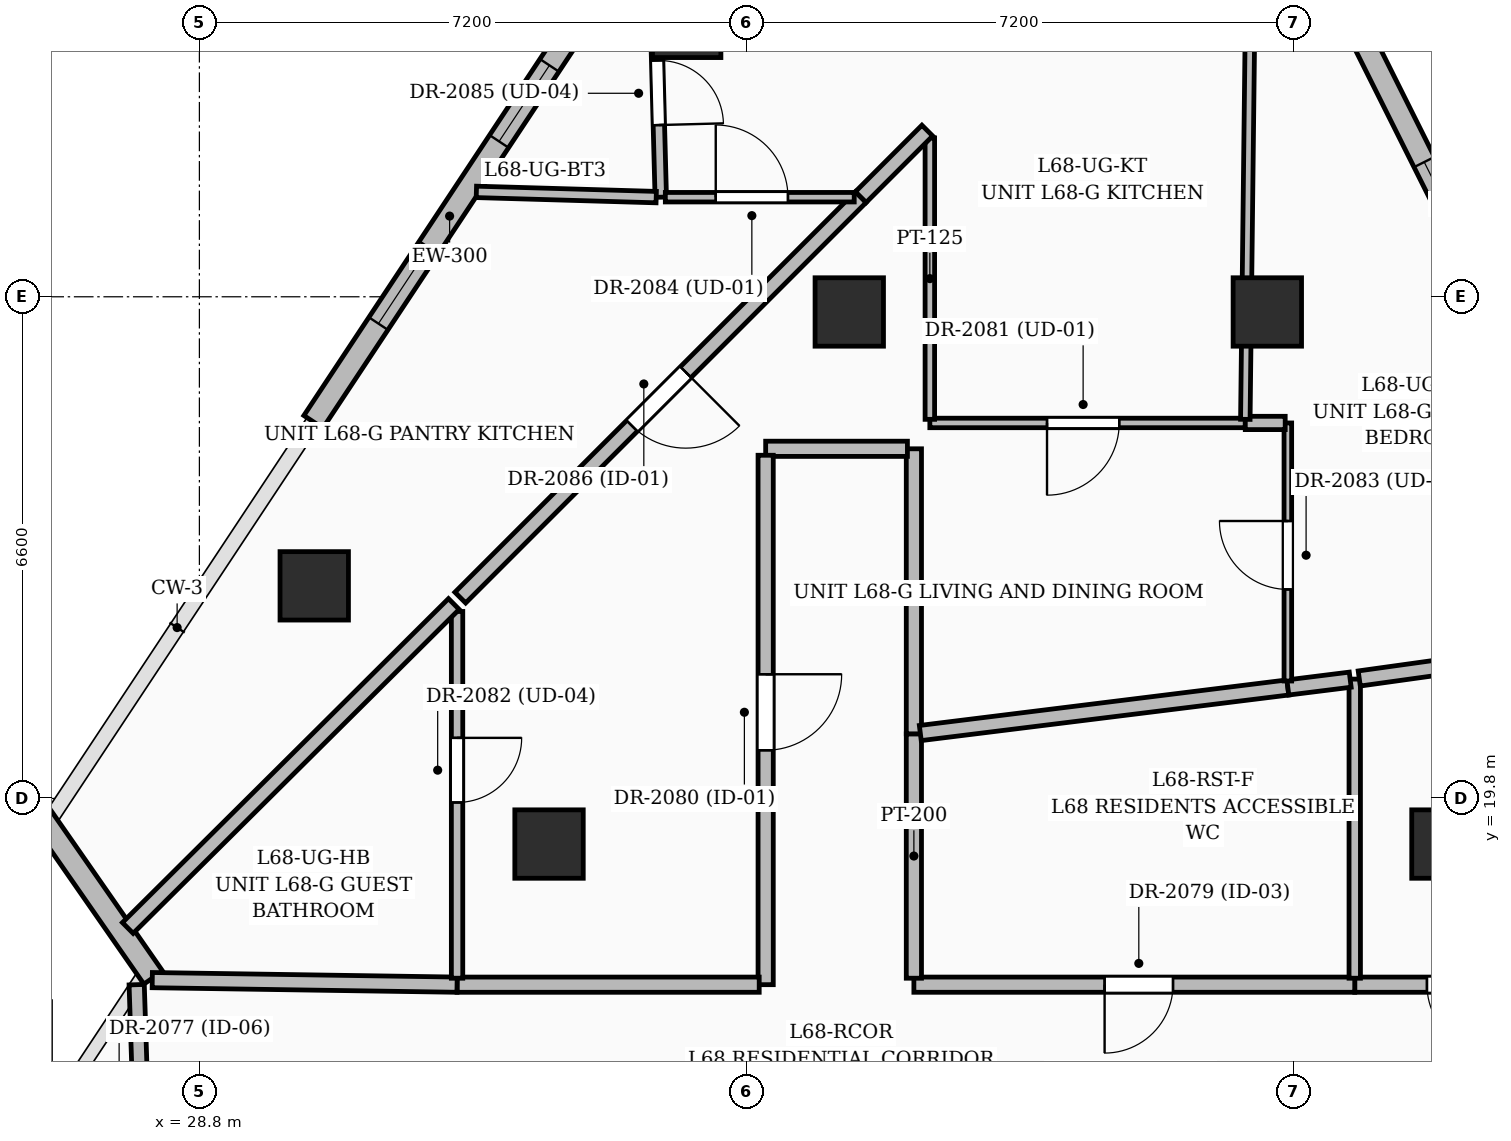
"""IFC4 building model, lengths in metres.
Left out: names, types, materials, properties, quantities, classifications, styles, units other than length and angle.
Written with IfcOpenShell. Run it as: python <this file> out.ifc"""

import sys

from ifc_helpers import new_model, si_unit, direction, frame, frame_2d, origin, origin_2d, place, context, subcontext, project, spatial, rectangle, extrude, element, fill, save


model = new_model("IFC4")
c1 = context("Model", 3, precision=1e-05, world=origin(), true_north=direction((0.0, 1.0)))
c2 = subcontext(c1, "Body", "Model", "MODEL_VIEW")
j1 = project(units=[si_unit("LENGTHUNIT", "METRE"), si_unit("PLANEANGLEUNIT", "RADIAN")], contexts=[c1])
p1 = place(None, origin())
s1 = spatial("IfcSite", under=j1, at=p1, CompositionType="ELEMENT")
p2 = place(p1, origin())
s2 = spatial("IfcBuilding", under=s1, at=p2, CompositionType="ELEMENT")
p3 = place(p2, frame((0.0, 0.0, 263.25)))
s3 = spatial("IfcBuildingStorey", under=s2, at=p3, CompositionType="ELEMENT", Elevation=263.25)
for number, where, z_axis, x_axis in (
    (1, (45.2, 19.2, 0.0), (0.0, 0.0, 1.0), (1.0, 0.0, 0.0)),
    (2, (42.85, 26.2, 0.0), (0.0, 0.0, 1.0), (1.0, 0.0, 0.0)),
    (3, (37.35, 26.2, 0.0), (0.0, 0.0, 1.0), (1.0, 0.0, 0.0)),
    (4, (33.4, 19.2, 0.0), (0.0, 0.0, 1.0), (1.0, 0.0, 0.0)),
    (5, (35.211, 29.997, 0.0), (0.0, 0.0, 1.0), (1.0, 0.0, 0.0)),
    (6, (30.311, 22.597, 0.0), (0.0, 0.0, 1.0), (1.0, 0.0, 0.0)),
):
    element("IfcColumn", number, at=place(p3, frame(where, z_axis=z_axis, x_axis=x_axis)), inside=s3, PredefinedType="COLUMN", context=c2, shape_type="SweptSolid", body=[
        extrude(rectangle(XDim=0.9, YDim=0.9, at=origin_2d()), origin(), (0.0, 0.0, 1.0), 3.75),
    ])
p4 = place(p3, frame((24.557, 16.318, 0.0), z_axis=(0.0, 0.0, 1.0), x_axis=(0.978804667181, -0.204796053441, 0.0)))
e7 = element("IfcWall", 7, at=p4, inside=s3, PredefinedType="SOLIDWALL", context=c2, shape_type="SweptSolid", body=[
    extrude(rectangle(XDim=2.594, YDim=0.3, at=frame_2d((1.297, 0.0))), origin(), (0.0, 0.0, 1.0), 2.825),
])
p5 = place(p4, frame((0.675, 0.0, 0.8)))
e8 = element("IfcOpeningElement", 8, at=p5, cuts=e7, PredefinedType="OPENING", context=c2, shape_type="SweptSolid", body=[
    extrude(rectangle(XDim=1.2, YDim=1.8, at=frame_2d((0.6, 0.9))), frame((0.0, 0.16, 0.0), z_axis=(0.0, -1.0, 0.0), x_axis=(1.0, 0.0, 0.0)), (0.0, 0.0, 1.0), 0.32),
])
p6 = place(p3, frame((28.193, 17.443, 0.0), z_axis=(0.0, 0.0, 1.0), x_axis=(-0.570819039355, 0.821075894367, 0.0)))
e9 = element("IfcWall", 9, at=p6, inside=s3, PredefinedType="SOLIDWALL", context=c2, shape_type="SweptSolid", body=[
    extrude(rectangle(XDim=2.594, YDim=0.3, at=frame_2d((1.297, 0.0))), origin(), (0.0, 0.0, 1.0), 2.825),
])
p7 = place(p3, frame((30.3, 24.755, 0.0), z_axis=(0.0, 0.0, 1.0), x_axis=(0.552146443909, 0.833747146609, 0.0)))
e10 = element("IfcWall", 10, at=p7, inside=s3, PredefinedType="SOLIDWALL", context=c2, shape_type="SweptSolid", body=[
    extrude(rectangle(XDim=6.493, YDim=0.3, at=frame_2d((3.246, 0.0))), origin(), (0.0, 0.0, 1.0), 3.5),
])
p8 = place(p7, frame((4.425, 0.0, 0.8)))
e11 = element("IfcOpeningElement", 11, at=p8, cuts=e10, PredefinedType="OPENING", context=c2, shape_type="SweptSolid", body=[
    extrude(rectangle(XDim=1.2, YDim=1.8, at=frame_2d((0.6, 0.9))), frame((0.0, 0.16, 0.0), z_axis=(0.0, -1.0, 0.0), x_axis=(1.0, 0.0, 0.0)), (0.0, 0.0, 1.0), 0.32),
])
p9 = place(p7, frame((1.55, 0.0, 0.8)))
e12 = element("IfcOpeningElement", 12, at=p9, cuts=e10, PredefinedType="OPENING", context=c2, shape_type="SweptSolid", body=[
    extrude(rectangle(XDim=1.2, YDim=1.8, at=frame_2d((0.6, 0.9))), frame((0.0, 0.16, 0.0), z_axis=(0.0, -1.0, 0.0), x_axis=(1.0, 0.0, 0.0)), (0.0, 0.0, 1.0), 0.32),
])
p10 = place(p3, frame((44.098, 29.804, 0.0), z_axis=(0.0, 0.0, 1.0), x_axis=(0.447260869873, -0.894403552252, 0.0)))
e13 = element("IfcWall", 13, at=p10, inside=s3, PredefinedType="SOLIDWALL", context=c2, shape_type="SweptSolid", body=[
    extrude(rectangle(XDim=6.197, YDim=0.3, at=frame_2d((3.099, 0.0))), origin(), (0.0, 0.0, 1.0), 3.5),
])
p11 = place(p10, frame((1.825, 0.0, 0.6)))
e14 = element("IfcOpeningElement", 14, at=p11, cuts=e13, PredefinedType="OPENING", context=c2, shape_type="SweptSolid", body=[
    extrude(rectangle(XDim=2.4, YDim=2.1, at=frame_2d((1.2, 1.05))), frame((0.0, 0.16, 0.0), z_axis=(0.0, -1.0, 0.0), x_axis=(1.0, 0.0, 0.0)), (0.0, 0.0, 1.0), 0.32),
])
p12 = place(p3, frame((27.975, 17.35, 0.0), z_axis=(0.0, 0.0, 1.0), x_axis=(0.032569486082, -0.999469473559, 0.0)))
e15 = element("IfcWall", 15, at=p12, inside=s3, PredefinedType="PARTITIONING", context=c2, shape_type="SweptSolid", body=[
    extrude(rectangle(XDim=2.301, YDim=0.2, at=frame_2d((1.151, 0.0))), origin(), (0.0, 0.0, 1.0), 3.5),
])
p13 = place(p12, frame((1.077, 0.0, 0.0)))
e16 = element("IfcOpeningElement", 16, at=p13, cuts=e15, PredefinedType="OPENING", context=c2, shape_type="SweptSolid", body=[
    extrude(rectangle(XDim=0.85, YDim=2.1, at=frame_2d((0.425, 1.05))), frame((0.0, 0.11, 0.0), z_axis=(0.0, -1.0, 0.0), x_axis=(1.0, 0.0, 0.0)), (0.0, 0.0, 1.0), 0.22),
])
p14 = place(p3, frame((46.715, 17.35, 0.0), z_axis=(0.0, 0.0, 1.0), x_axis=(-1.0, 0.0, 0.0)))
e17 = element("IfcWall", 17, at=p14, inside=s3, PredefinedType="PARTITIONING", context=c2, shape_type="SweptSolid", body=[
    extrude(rectangle(XDim=2.715, YDim=0.2, at=frame_2d((1.357, 0.0))), origin(), (0.0, 0.0, 1.0), 2.685),
])
p15 = place(p14, frame((0.865, 0.0, 0.0)))
e18 = element("IfcOpeningElement", 18, at=p15, cuts=e17, PredefinedType="OPENING", context=c2, shape_type="SweptSolid", body=[
    extrude(rectangle(XDim=0.9, YDim=2.1, at=frame_2d((0.45, 1.05))), frame((0.0, 0.11, 0.0), z_axis=(0.0, -1.0, 0.0), x_axis=(1.0, 0.0, 0.0)), (0.0, 0.0, 1.0), 0.22),
])
p16 = place(p3, frame((44.0, 17.35, 0.0), z_axis=(0.0, 0.0, 1.0), x_axis=(-1.0, 0.0, 0.0)))
e19 = element("IfcWall", 19, at=p16, inside=s3, PredefinedType="PARTITIONING", context=c2, shape_type="SweptSolid", body=[
    extrude(rectangle(XDim=5.8, YDim=0.2, at=frame_2d((2.9, 0.0))), origin(), (0.0, 0.0, 1.0), 3.5),
])
p17 = place(p16, frame((2.391, 0.0, 0.0)))
e20 = element("IfcOpeningElement", 20, at=p17, cuts=e19, PredefinedType="OPENING", context=c2, shape_type="SweptSolid", body=[
    extrude(rectangle(XDim=0.9, YDim=2.1, at=frame_2d((0.45, 1.05))), frame((0.0, 0.11, 0.0), z_axis=(0.0, -1.0, 0.0), x_axis=(1.0, 0.0, 0.0)), (0.0, 0.0, 1.0), 0.22),
])
p18 = place(p3, frame((38.2, 17.435, 0.0), z_axis=(0.0, 0.0, 1.0), x_axis=(0.0, 1.0, 0.0)))
e21 = element("IfcWall", 21, at=p18, inside=s3, PredefinedType="PARTITIONING", context=c2, shape_type="SweptSolid", body=[
    extrude(rectangle(XDim=3.215, YDim=0.2, at=frame_2d((1.607, 0.0))), origin(), (0.0, 0.0, 1.0), 3.5),
])
p19 = place(p3, frame((38.2, 20.65, 0.0), z_axis=(0.0, 0.0, 1.0), x_axis=(0.0, 1.0, 0.0)))
e22 = element("IfcWall", 22, at=p19, inside=s3, PredefinedType="PARTITIONING", context=c2, shape_type="SweptSolid", body=[
    extrude(rectangle(XDim=3.75, YDim=0.2, at=frame_2d((1.875, 0.0))), origin(), (0.0, 0.0, 1.0), 3.5),
])
p20 = place(p3, frame((38.115, 24.4, 0.0), z_axis=(0.0, 0.0, 1.0), x_axis=(-1.0, 0.0, 0.0)))
e23 = element("IfcWall", 23, at=p20, inside=s3, PredefinedType="PARTITIONING", context=c2, shape_type="SweptSolid", body=[
    extrude(rectangle(XDim=1.865, YDim=0.2, at=frame_2d((0.933, 0.0))), origin(), (0.0, 0.0, 1.0), 2.685),
])
p21 = place(p3, frame((36.25, 24.315, 0.0), z_axis=(0.0, 0.0, 1.0), x_axis=(0.0, -1.0, 0.0)))
e24 = element("IfcWall", 24, at=p21, inside=s3, PredefinedType="PARTITIONING", context=c2, shape_type="SweptSolid", body=[
    extrude(rectangle(XDim=6.965, YDim=0.2, at=frame_2d((3.482, 0.0))), origin(), (0.0, 0.0, 1.0), 2.685),
])
p22 = place(p21, frame((2.881, 0.0, 0.0)))
e25 = element("IfcOpeningElement", 25, at=p22, cuts=e24, PredefinedType="OPENING", context=c2, shape_type="SweptSolid", body=[
    extrude(rectangle(XDim=1.0, YDim=2.2, at=frame_2d((0.5, 1.1))), frame((0.0, 0.11, 0.0), z_axis=(0.0, -1.0, 0.0), x_axis=(1.0, 0.0, 0.0)), (0.0, 0.0, 1.0), 0.22),
])
p23 = place(p3, frame((36.165, 17.35, 0.0), z_axis=(0.0, 0.0, 1.0), x_axis=(-1.0, 0.0, 0.0)))
e26 = element("IfcWall", 26, at=p23, inside=s3, PredefinedType="PARTITIONING", context=c2, shape_type="SweptSolid", body=[
    extrude(rectangle(XDim=3.975, YDim=0.2, at=frame_2d((1.988, 0.0))), origin(), (0.0, 0.0, 1.0), 2.685),
])
p24 = place(p3, frame((32.19, 17.35, 0.0), z_axis=(0.0, 0.0, 1.0), x_axis=(-0.999888770764, 0.014914627022, 0.0)))
e27 = element("IfcWall", 27, at=p24, inside=s3, PredefinedType="PARTITIONING", context=c2, shape_type="SweptSolid", body=[
    extrude(rectangle(XDim=4.01, YDim=0.2, at=frame_2d((2.005, 0.0))), origin(), (0.0, 0.0, 1.0), 3.5),
])
p25 = place(p3, frame((44.0, 21.37, 0.0), z_axis=(0.0, 0.0, 1.0), x_axis=(0.0, -1.0, 0.0)))
e28 = element("IfcWall", 28, at=p25, inside=s3, PredefinedType="PARTITIONING", context=c2, shape_type="SweptSolid", body=[
    extrude(rectangle(XDim=3.935, YDim=0.15, at=frame_2d((1.968, 0.0))), origin(), (0.0, 0.0, 1.0), 3.5),
])
p26 = place(p3, frame((45.787, 21.619, 0.0), z_axis=(0.0, 0.0, 1.0), x_axis=(-0.99045250239, -0.137854417812, 0.0)))
e29 = element("IfcWall", 29, at=p26, inside=s3, PredefinedType="PARTITIONING", context=c2, shape_type="SweptSolid", body=[
    extrude(rectangle(XDim=1.744, YDim=0.2, at=frame_2d((0.872, 0.0))), origin(), (0.0, 0.0, 1.0), 2.685),
])
p27 = place(p3, frame((43.12, 21.26, 0.0), z_axis=(0.0, 0.0, 1.0), x_axis=(-0.992399953156, -0.123054187154, 0.0)))
e30 = element("IfcWall", 30, at=p27, inside=s3, PredefinedType="PARTITIONING", context=c2, shape_type="SweptSolid", body=[
    extrude(rectangle(XDim=4.873, YDim=0.2, at=frame_2d((2.437, 0.0))), origin(), (0.0, 0.0, 1.0), 3.5),
])
p28 = place(p3, frame((43.94, 21.363, 0.0), z_axis=(0.0, 0.0, 1.0), x_axis=(-0.992277876714, -0.124034734589, 0.0)))
e31 = element("IfcWall", 31, at=p28, inside=s3, PredefinedType="PARTITIONING", context=c2, shape_type="SweptSolid", body=[
    extrude(rectangle(XDim=0.827, YDim=0.2, at=frame_2d((0.413, 0.0))), origin(), (0.0, 0.0, 1.0), 3.5),
])
p29 = place(p3, frame((32.19, 22.26, 0.0), z_axis=(0.0, 0.0, 1.0), x_axis=(0.0, -1.0, 0.0)))
e32 = element("IfcWall", 32, at=p29, inside=s3, PredefinedType="PARTITIONING", context=c2, shape_type="SweptSolid", body=[
    extrude(rectangle(XDim=4.825, YDim=0.15, at=frame_2d((2.413, 0.0))), origin(), (0.0, 0.0, 1.0), 2.764),
])
p30 = place(p29, frame((1.663, 0.0, 0.0)))
e33 = element("IfcOpeningElement", 33, at=p30, cuts=e32, PredefinedType="OPENING", context=c2, shape_type="SweptSolid", body=[
    extrude(rectangle(XDim=0.85, YDim=2.1, at=frame_2d((0.425, 1.05))), frame((0.0, 0.085, 0.0), z_axis=(0.0, -1.0, 0.0), x_axis=(1.0, 0.0, 0.0)), (0.0, 0.0, 1.0), 0.17),
])
p31 = place(p3, frame((42.56, 24.74, 0.0), z_axis=(0.0, 0.0, 1.0), x_axis=(-1.0, 0.0, 0.0)))
e34 = element("IfcWall", 34, at=p31, inside=s3, PredefinedType="PARTITIONING", context=c2, shape_type="SweptSolid", body=[
    extrude(rectangle(XDim=4.15, YDim=0.125, at=frame_2d((2.075, 0.0))), origin(), (0.0, 0.0, 1.0), 3.5),
])
p32 = place(p31, frame((1.658, 0.0, 0.0)))
e35 = element("IfcOpeningElement", 35, at=p32, cuts=e34, PredefinedType="OPENING", context=c2, shape_type="SweptSolid", body=[
    extrude(rectangle(XDim=0.95, YDim=2.2, at=frame_2d((0.475, 1.1))), frame((0.0, 0.072, 0.0), z_axis=(0.0, -1.0, 0.0), x_axis=(1.0, 0.0, 0.0)), (0.0, 0.0, 1.0), 0.145),
])
p33 = place(p3, frame((38.41, 24.788, 0.0), z_axis=(0.0, 0.0, 1.0), x_axis=(0.0, 1.0, 0.0)))
e36 = element("IfcWall", 36, at=p33, inside=s3, PredefinedType="PARTITIONING", context=c2, shape_type="SweptSolid", body=[
    extrude(rectangle(XDim=3.702, YDim=0.125, at=frame_2d((1.851, 0.0))), origin(), (0.0, 0.0, 1.0), 2.52),
])
p34 = place(p3, frame((43.12, 21.345, 0.0), z_axis=(0.0, 0.0, 1.0), x_axis=(0.0, 1.0, 0.0)))
e37 = element("IfcWall", 37, at=p34, inside=s3, PredefinedType="PARTITIONING", context=c2, shape_type="SweptSolid", body=[
    extrude(rectangle(XDim=3.395, YDim=0.1, at=frame_2d((1.698, 0.0))), origin(), (0.0, 0.0, 1.0), 2.685),
])
p35 = place(p34, frame((1.205, 0.0, 0.0)))
e38 = element("IfcOpeningElement", 38, at=p35, cuts=e37, PredefinedType="OPENING", context=c2, shape_type="SweptSolid", body=[
    extrude(rectangle(XDim=0.9, YDim=2.15, at=frame_2d((0.45, 1.075))), frame((0.0, 0.06, 0.0), z_axis=(0.0, -1.0, 0.0), x_axis=(1.0, 0.0, 0.0)), (0.0, 0.0, 1.0), 0.12),
])
p36 = place(p3, frame((43.085, 24.74, 0.0), z_axis=(0.0, 0.0, 1.0), x_axis=(-1.0, 0.0, 0.0)))
e39 = element("IfcWall", 39, at=p36, inside=s3, PredefinedType="PARTITIONING", context=c2, shape_type="SweptSolid", body=[
    extrude(rectangle(XDim=0.525, YDim=0.175, at=frame_2d((0.262, 0.0))), origin(), (0.0, 0.0, 1.0), 3.5),
])
p37 = place(p3, frame((38.376, 28.586, 0.0), z_axis=(0.0, 0.0, 1.0), x_axis=(-0.707106781187, -0.707106781187, 0.0)))
e40 = element("IfcWall", 40, at=p37, inside=s3, PredefinedType="PARTITIONING", context=c2, shape_type="SweptSolid", body=[
    extrude(rectangle(XDim=1.24, YDim=0.2, at=frame_2d((0.62, 0.0))), origin(), (0.0, 0.0, 1.0), 3.5),
])
p38 = place(p3, frame((37.5, 27.71, 0.0), z_axis=(0.0, 0.0, 1.0), x_axis=(-0.707106781187, -0.707106781187, 0.0)))
e41 = element("IfcWall", 41, at=p38, inside=s3, PredefinedType="PARTITIONING", context=c2, shape_type="SweptSolid", body=[
    extrude(rectangle(XDim=7.449, YDim=0.2, at=frame_2d((3.725, 0.0))), origin(), (0.0, 0.0, 1.0), 2.764),
])
p39 = place(p38, frame((3.255, 0.0, 0.0)))
e42 = element("IfcOpeningElement", 42, at=p39, cuts=e41, PredefinedType="OPENING", context=c2, shape_type="SweptSolid", body=[
    extrude(rectangle(XDim=1.0, YDim=2.2, at=frame_2d((0.5, 1.1))), frame((0.0, 0.11, 0.0), z_axis=(0.0, -1.0, 0.0), x_axis=(1.0, 0.0, 0.0)), (0.0, 0.0, 1.0), 0.22),
])
p40 = place(p3, frame((32.147, 22.358, 0.0), z_axis=(0.0, 0.0, 1.0), x_axis=(-0.709404461914, -0.70480160997, 0.0)))
e43 = element("IfcWall", 43, at=p40, inside=s3, PredefinedType="PARTITIONING", context=c2, shape_type="SweptSolid", body=[
    extrude(rectangle(XDim=6.047, YDim=0.2, at=frame_2d((3.023, 0.0))), origin(), (0.0, 0.0, 1.0), 2.764),
])
p41 = place(p3, frame((42.561, 24.788, 0.0), z_axis=(0.0, 0.0, 1.0), x_axis=(0.011862322193, 0.999929640181, 0.0)))
e44 = element("IfcWall", 44, at=p41, inside=s3, PredefinedType="PARTITIONING", context=c2, shape_type="SweptSolid", body=[
    extrude(rectangle(XDim=7.615, YDim=0.125, at=frame_2d((3.808, 0.0))), origin(), (0.0, 0.0, 1.0), 2.764),
])
p42 = place(p3, frame((34.776, 31.252, 0.0), z_axis=(0.0, 0.0, 1.0), x_axis=(0.026596598545, -0.999646247903, 0.0)))
e45 = element("IfcWall", 45, at=p42, inside=s3, PredefinedType="PARTITIONING", context=c2, shape_type="SweptSolid", body=[
    extrude(rectangle(XDim=3.543, YDim=0.15, at=frame_2d((1.771, 0.0))), origin(), (0.0, 0.0, 1.0), 2.82),
])
p43 = place(p42, frame((1.744, 0.0, 0.0)))
e46 = element("IfcOpeningElement", 46, at=p43, cuts=e45, PredefinedType="OPENING", context=c2, shape_type="SweptSolid", body=[
    extrude(rectangle(XDim=0.85, YDim=2.1, at=frame_2d((0.425, 1.05))), frame((0.0, 0.085, 0.0), z_axis=(0.0, -1.0, 0.0), x_axis=(1.0, 0.0, 0.0)), (0.0, 0.0, 1.0), 0.17),
])
p44 = place(p3, frame((34.93, 27.71, 0.0), z_axis=(0.0, 0.0, 1.0), x_axis=(1.0, 0.0, 0.0)))
e47 = element("IfcWall", 47, at=p44, inside=s3, PredefinedType="PARTITIONING", context=c2, shape_type="SweptSolid", body=[
    extrude(rectangle(XDim=2.485, YDim=0.125, at=frame_2d((1.243, 0.0))), origin(), (0.0, 0.0, 1.0), 2.764),
])
p45 = place(p44, frame((0.663, 0.0, 0.0)))
e48 = element("IfcOpeningElement", 48, at=p45, cuts=e47, PredefinedType="OPENING", context=c2, shape_type="SweptSolid", body=[
    extrude(rectangle(XDim=0.95, YDim=2.2, at=frame_2d((0.475, 1.1))), frame((0.0, 0.072, 0.0), z_axis=(0.0, -1.0, 0.0), x_axis=(1.0, 0.0, 0.0)), (0.0, 0.0, 1.0), 0.145),
])
p46 = place(p3, frame((32.444, 27.78, 0.0), z_axis=(0.0, 0.0, 1.0), x_axis=(0.999576888009, -0.029086851968, 0.0)))
e49 = element("IfcWall", 49, at=p46, inside=s3, PredefinedType="PARTITIONING", context=c2, shape_type="SweptSolid", body=[
    extrude(rectangle(XDim=2.367, YDim=0.15, at=frame_2d((1.184, 0.0))), origin(), (0.0, 0.0, 1.0), 2.82),
])
p47 = place(p8, origin())
e50 = element("IfcWindow", 50, at=p47, inside=s3, PartitioningType="SINGLE_PANEL", PredefinedType="WINDOW", context=c2, shape_type="SweptSolid", body=[
    extrude(rectangle(XDim=1.2, YDim=1.8, at=frame_2d((0.6, 0.9))), frame((0.0, 0.03, 0.0), z_axis=(0.0, -1.0, 0.0), x_axis=(1.0, 0.0, 0.0)), (0.0, 0.0, 1.0), 0.06),
])
fill(e11, e50)
p48 = place(p9, origin())
e51 = element("IfcWindow", 51, at=p48, inside=s3, PartitioningType="SINGLE_PANEL", PredefinedType="WINDOW", context=c2, shape_type="SweptSolid", body=[
    extrude(rectangle(XDim=1.2, YDim=1.8, at=frame_2d((0.6, 0.9))), frame((0.0, 0.03, 0.0), z_axis=(0.0, -1.0, 0.0), x_axis=(1.0, 0.0, 0.0)), (0.0, 0.0, 1.0), 0.06),
])
fill(e12, e51)
p49 = place(p11, origin())
e52 = element("IfcWindow", 52, at=p49, inside=s3, PartitioningType="SINGLE_PANEL", PredefinedType="WINDOW", context=c2, shape_type="SweptSolid", body=[
    extrude(rectangle(XDim=2.4, YDim=2.1, at=frame_2d((1.2, 1.05))), frame((0.0, 0.03, 0.0), z_axis=(0.0, -1.0, 0.0), x_axis=(1.0, 0.0, 0.0)), (0.0, 0.0, 1.0), 0.06),
])
fill(e14, e52)
p50 = place(p15, origin())
e53 = element("IfcDoor", 53, at=p50, inside=s3, OperationType="SINGLE_SWING_LEFT", PredefinedType="DOOR", context=c2, shape_type="SweptSolid", body=[
    extrude(rectangle(XDim=0.9, YDim=2.1, at=frame_2d((0.45, 1.05))), frame((0.0, 0.025, 0.0), z_axis=(0.0, -1.0, 0.0), x_axis=(1.0, 0.0, 0.0)), (0.0, 0.0, 1.0), 0.05),
])
fill(e18, e53)
p51 = place(p17, origin())
e54 = element("IfcDoor", 54, at=p51, inside=s3, OperationType="SINGLE_SWING_RIGHT", PredefinedType="DOOR", context=c2, shape_type="SweptSolid", body=[
    extrude(rectangle(XDim=0.9, YDim=2.1, at=frame_2d((0.45, 1.05))), frame((0.0, 0.025, 0.0), z_axis=(0.0, -1.0, 0.0), x_axis=(1.0, 0.0, 0.0)), (0.0, 0.0, 1.0), 0.05),
])
fill(e20, e54)
p52 = place(p22, origin())
e55 = element("IfcDoor", 55, at=p52, inside=s3, OperationType="SINGLE_SWING_LEFT", PredefinedType="DOOR", context=c2, shape_type="SweptSolid", body=[
    extrude(rectangle(XDim=1.0, YDim=2.2, at=frame_2d((0.5, 1.1))), frame((0.0, 0.025, 0.0), z_axis=(0.0, -1.0, 0.0), x_axis=(1.0, 0.0, 0.0)), (0.0, 0.0, 1.0), 0.05),
])
fill(e25, e55)
p53 = place(p32, origin())
e56 = element("IfcDoor", 56, at=p53, inside=s3, OperationType="SINGLE_SWING_RIGHT", PredefinedType="DOOR", context=c2, shape_type="SweptSolid", body=[
    extrude(rectangle(XDim=0.95, YDim=2.2, at=frame_2d((0.475, 1.1))), frame((0.0, 0.025, 0.0), z_axis=(0.0, -1.0, 0.0), x_axis=(1.0, 0.0, 0.0)), (0.0, 0.0, 1.0), 0.05),
])
fill(e35, e56)
p54 = place(p30, origin())
e57 = element("IfcDoor", 57, at=p54, inside=s3, OperationType="SINGLE_SWING_LEFT", PredefinedType="DOOR", context=c2, shape_type="SweptSolid", body=[
    extrude(rectangle(XDim=0.85, YDim=2.1, at=frame_2d((0.425, 1.05))), frame((0.0, 0.025, 0.0), z_axis=(0.0, -1.0, 0.0), x_axis=(1.0, 0.0, 0.0)), (0.0, 0.0, 1.0), 0.05),
])
fill(e33, e57)
p55 = place(p35, origin())
e58 = element("IfcDoor", 58, at=p55, inside=s3, OperationType="SINGLE_SWING_RIGHT", PredefinedType="DOOR", context=c2, shape_type="SweptSolid", body=[
    extrude(rectangle(XDim=0.9, YDim=2.15, at=frame_2d((0.45, 1.075))), frame((0.0, 0.025, 0.0), z_axis=(0.0, -1.0, 0.0), x_axis=(1.0, 0.0, 0.0)), (0.0, 0.0, 1.0), 0.05),
])
fill(e38, e58)
p56 = place(p45, origin())
e59 = element("IfcDoor", 59, at=p56, inside=s3, OperationType="SINGLE_SWING_LEFT", PredefinedType="DOOR", context=c2, shape_type="SweptSolid", body=[
    extrude(rectangle(XDim=0.95, YDim=2.2, at=frame_2d((0.475, 1.1))), frame((0.0, 0.025, 0.0), z_axis=(0.0, -1.0, 0.0), x_axis=(1.0, 0.0, 0.0)), (0.0, 0.0, 1.0), 0.05),
])
fill(e48, e59)
p57 = place(p43, origin())
e60 = element("IfcDoor", 60, at=p57, inside=s3, OperationType="SINGLE_SWING_RIGHT", PredefinedType="DOOR", context=c2, shape_type="SweptSolid", body=[
    extrude(rectangle(XDim=0.85, YDim=2.1, at=frame_2d((0.425, 1.05))), frame((0.0, 0.025, 0.0), z_axis=(0.0, -1.0, 0.0), x_axis=(1.0, 0.0, 0.0)), (0.0, 0.0, 1.0), 0.05),
])
fill(e46, e60)
p58 = place(p39, origin())
e61 = element("IfcDoor", 61, at=p58, inside=s3, OperationType="SINGLE_SWING_LEFT", PredefinedType="DOOR", context=c2, shape_type="SweptSolid", body=[
    extrude(rectangle(XDim=1.0, YDim=2.2, at=frame_2d((0.5, 1.1))), frame((0.0, 0.025, 0.0), z_axis=(0.0, -1.0, 0.0), x_axis=(1.0, 0.0, 0.0)), (0.0, 0.0, 1.0), 0.05),
])
fill(e42, e61)
save(model, sys.argv[1])
